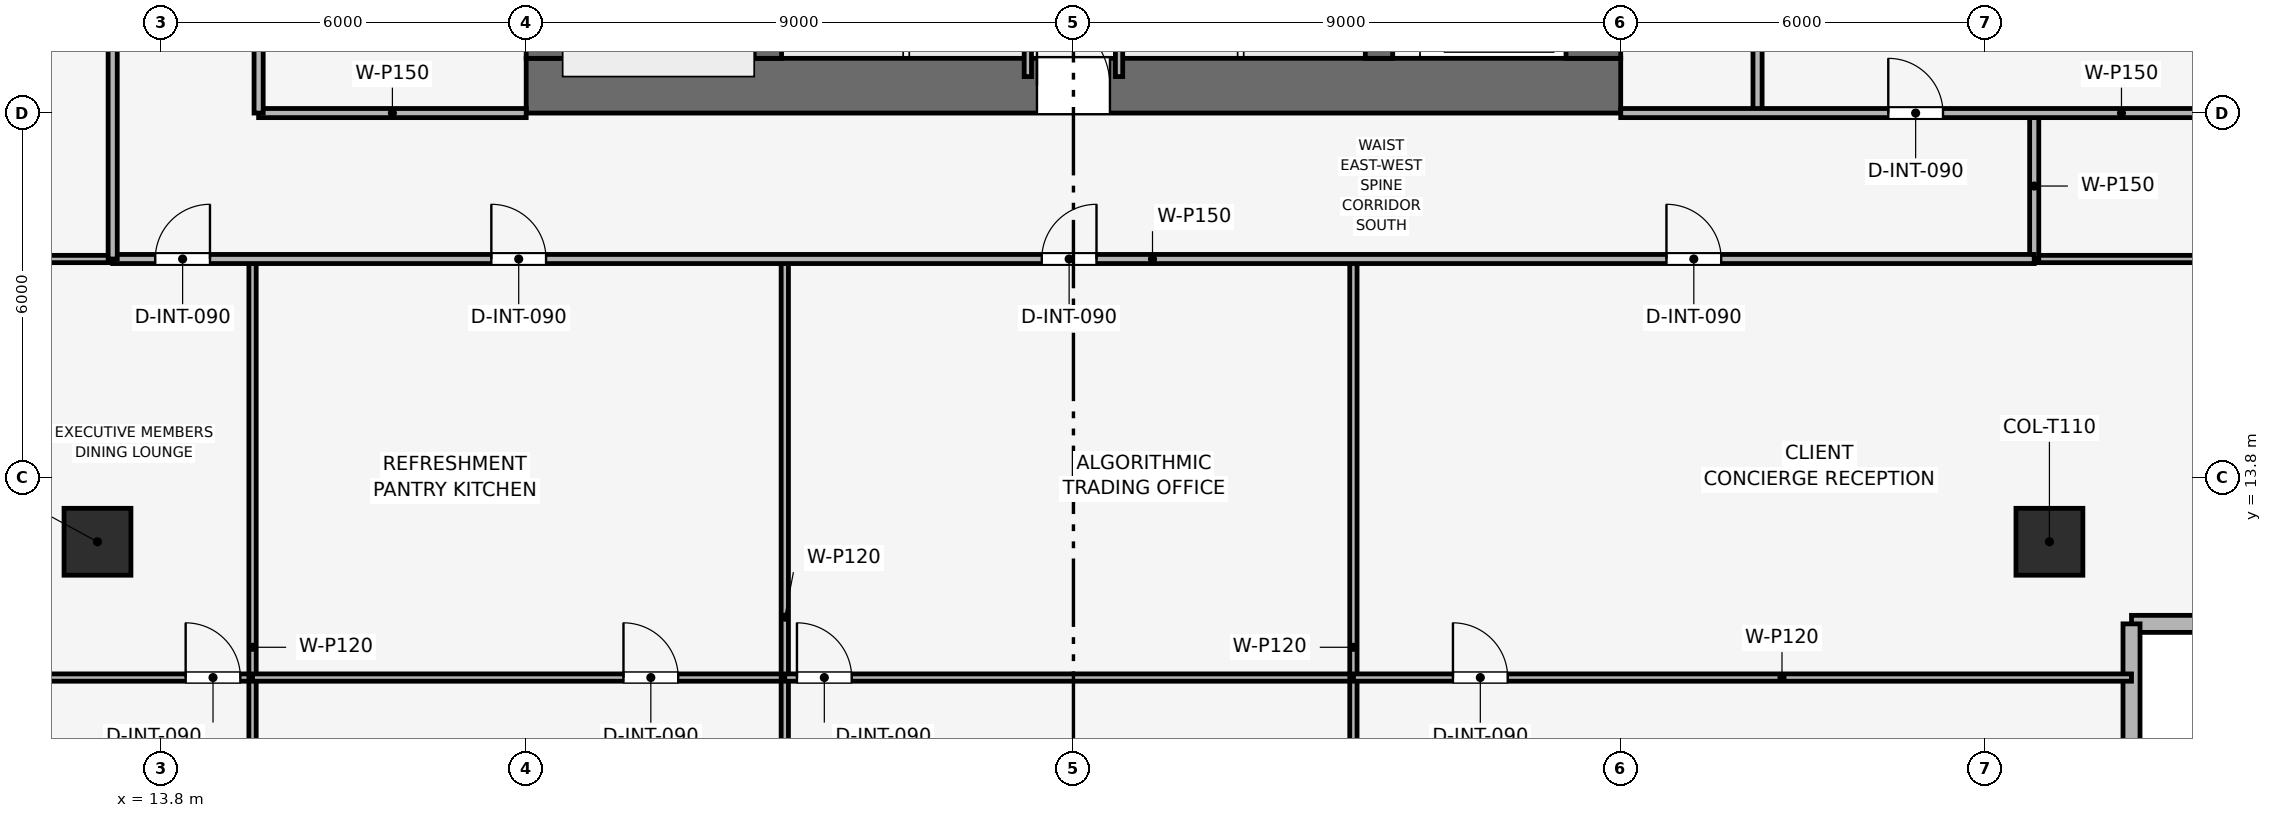
"""IFC4 building model, lengths in metres.
Left out: names, types, materials, properties, quantities, classifications, styles, units other than length and angle.
Written with IfcOpenShell. Run it as: python <this file> out.ifc"""

import sys

from ifc_helpers import new_model, si_unit, direction, frame, frame_2d, origin, origin_2d, place, context, subcontext, project, spatial, rectangle, extrude, element, fill, save


model = new_model("IFC4")
c1 = context("Model", 3, precision=1e-05, world=origin(), true_north=direction((0.0, 1.0)))
c2 = subcontext(c1, "Body", "Model", "MODEL_VIEW")
j1 = project(units=[si_unit("LENGTHUNIT", "METRE"), si_unit("PLANEANGLEUNIT", "RADIAN")], contexts=[c1])
p1 = place(None, origin())
s1 = spatial("IfcSite", under=j1, at=p1, CompositionType="ELEMENT")
p2 = place(p1, origin())
s2 = spatial("IfcBuilding", under=s1, at=p2, CompositionType="ELEMENT")
p3 = place(p2, frame((0.0, 0.0, 168.3)))
s3 = spatial("IfcBuildingStorey", under=s2, at=p3, CompositionType="ELEMENT", Elevation=168.3)
p4 = place(p3, frame((19.8, 20.25, 0.0), z_axis=(0.0, 0.0, 1.0), x_axis=(1.0, 0.0, 0.0)))
e1 = element("IfcWall", 1, at=p4, inside=s3, PredefinedType="SHEAR", context=c2, shape_type="SweptSolid", body=[
    extrude(rectangle(XDim=18.0, YDim=0.9, at=frame_2d((9.0, 0.0))), origin(), (0.0, 0.0, 1.0), 3.75),
])
p5 = place(p4, frame((8.4, 0.0, 0.0)))
e2 = element("IfcOpeningElement", 2, at=p5, cuts=e1, PredefinedType="OPENING", context=c2, shape_type="SweptSolid", body=[
    extrude(rectangle(XDim=1.2, YDim=2.2, at=frame_2d((0.6, 1.1))), frame((0.0, 0.46, 0.0), z_axis=(0.0, -1.0, 0.0), x_axis=(1.0, 0.0, 0.0)), (0.0, 0.0, 1.0), 0.92),
])
p6 = place(p3, frame((20.25, 20.7, 0.0), z_axis=(0.0, 0.0, 1.0), x_axis=(0.0, 1.0, 0.0)))
e3 = element("IfcWall", 3, at=p6, inside=s3, PredefinedType="SHEAR", context=c2, shape_type="SweptSolid", body=[
    extrude(rectangle(XDim=16.2, YDim=0.9, at=frame_2d((8.1, 0.0))), origin(), (0.0, 0.0, 1.0), 3.75),
])
p7 = place(p6, frame((10.1, 0.0, 0.0)))
e4 = element("IfcOpeningElement", 4, at=p7, cuts=e3, PredefinedType="OPENING", context=c2, shape_type="SweptSolid", body=[
    extrude(rectangle(XDim=1.1, YDim=2.15, at=frame_2d((0.55, 1.075))), frame((0.0, 0.46, 0.0), z_axis=(0.0, -1.0, 0.0), x_axis=(1.0, 0.0, 0.0)), (0.0, 0.0, 1.0), 0.92),
])
p8 = place(p3, frame((37.35, 20.7, 0.0), z_axis=(0.0, 0.0, 1.0), x_axis=(0.0, 1.0, 0.0)))
e5 = element("IfcWall", 5, at=p8, inside=s3, PredefinedType="SHEAR", context=c2, shape_type="SweptSolid", body=[
    extrude(rectangle(XDim=16.2, YDim=0.9, at=frame_2d((8.1, 0.0))), origin(), (0.0, 0.0, 1.0), 3.75),
])
p9 = place(p8, frame((4.6, 0.0, 0.0)))
e6 = element("IfcOpeningElement", 6, at=p9, cuts=e5, PredefinedType="OPENING", context=c2, shape_type="SweptSolid", body=[
    extrude(rectangle(XDim=1.1, YDim=2.15, at=frame_2d((0.55, 1.075))), frame((0.0, 0.46, 0.0), z_axis=(0.0, -1.0, 0.0), x_axis=(1.0, 0.0, 0.0)), (0.0, 0.0, 1.0), 0.92),
])
for number, where, z_axis, x_axis in (
    (7, (23.775, 20.7, 0.0), (0.0, 0.0, 1.0), (0.0, 1.0, 0.0)),
    (8, (33.825, 20.7, 0.0), (0.0, 0.0, 1.0), (0.0, 1.0, 0.0)),
):
    element("IfcWall", number, at=place(p3, frame(where, z_axis=z_axis, x_axis=x_axis)), inside=s3, PredefinedType="SHEAR", context=c2, shape_type="SweptSolid", body=[
        extrude(rectangle(XDim=16.2, YDim=0.45, at=frame_2d((8.1, 0.0))), origin(), (0.0, 0.0, 1.0), 3.75),
    ])
for number, where, z_axis, x_axis in (
    (9, (12.75, 12.75, 0.003), (0.0, 0.0, 1.0), (1.0, 0.0, 0.0)),
    (10, (44.85, 12.75, 0.003), (0.0, 0.0, 1.0), (1.0, 0.0, 0.0)),
):
    element("IfcColumn", number, at=place(p3, frame(where, z_axis=z_axis, x_axis=x_axis)), inside=s3, PredefinedType="COLUMN", context=c2, shape_type="SweptSolid", body=[
        extrude(rectangle(XDim=1.1, YDim=1.1, at=origin_2d()), origin(), (0.0, 0.0, 1.0), 3.489),
    ])
p10 = place(p3, frame((52.97, 11.4, 0.0), z_axis=(0.0, 0.0, 1.0), x_axis=(-1.0, 0.0, 0.0)))
e11 = element("IfcWall", 11, at=p10, inside=s3, PredefinedType="SOLIDWALL", context=c2, shape_type="SweptSolid", body=[
    extrude(rectangle(XDim=6.77, YDim=0.28, at=frame_2d((3.385, 0.0))), origin(), (0.0, 0.0, 1.0), 3.495),
])
p11 = place(p10, frame((2.135, 0.0, 0.9)))
e12 = element("IfcOpeningElement", 12, at=p11, cuts=e11, PredefinedType="OPENING", context=c2, shape_type="SweptSolid", body=[
    extrude(rectangle(XDim=2.5, YDim=1.9, at=frame_2d((1.25, 0.95))), frame((0.0, 0.15, 0.0), z_axis=(0.0, -1.0, 0.0), x_axis=(1.0, 0.0, 0.0)), (0.0, 0.0, 1.0), 0.3),
])
p12 = place(p3, frame((46.2, 11.4, 0.0), z_axis=(0.0, 0.0, 1.0), x_axis=(0.0, -1.0, 0.0)))
e13 = element("IfcWall", 13, at=p12, inside=s3, PredefinedType="SOLIDWALL", context=c2, shape_type="SweptSolid", body=[
    extrude(rectangle(XDim=6.77, YDim=0.28, at=frame_2d((3.385, 0.0))), origin(), (0.0, 0.0, 1.0), 3.495),
])
p13 = place(p12, frame((2.135, 0.0, 0.9)))
e14 = element("IfcOpeningElement", 14, at=p13, cuts=e13, PredefinedType="OPENING", context=c2, shape_type="SweptSolid", body=[
    extrude(rectangle(XDim=2.5, YDim=1.9, at=frame_2d((1.25, 0.95))), frame((0.0, 0.15, 0.0), z_axis=(0.0, -1.0, 0.0), x_axis=(1.0, 0.0, 0.0)), (0.0, 0.0, 1.0), 0.3),
])
for number, where, z_axis, x_axis in (
    (15, (28.05, 20.4, 0.0), (0.0, 0.0, 1.0), (0.0, 1.0, 0.0)),
    (16, (29.55, 20.4, 0.0), (0.0, 0.0, 1.0), (0.0, 1.0, 0.0)),
):
    element("IfcWall", number, at=place(p3, frame(where, z_axis=z_axis, x_axis=x_axis)), inside=s3, PredefinedType="PARTITIONING", context=c2, shape_type="SweptSolid", body=[
        extrude(rectangle(XDim=2.75, YDim=0.12, at=frame_2d((1.375, 0.0))), origin(), (0.0, 0.0, 1.0), 3.495),
    ])
p14 = place(p3, frame((15.4, 19.8, 0.0), z_axis=(0.0, 0.0, 1.0), x_axis=(1.0, 0.0, 0.0)))
e17 = element("IfcWall", 17, at=p14, inside=s3, PredefinedType="PARTITIONING", context=c2, shape_type="SweptSolid", body=[
    extrude(rectangle(XDim=4.4, YDim=0.15, at=frame_2d((2.2, 0.0))), origin(), (0.0, 0.0, 1.0), 3.03),
])
p15 = place(p3, frame((15.4, 19.8, 0.0), z_axis=(0.0, 0.0, 1.0), x_axis=(0.0, 1.0, 0.0)))
e18 = element("IfcWall", 18, at=p15, inside=s3, PredefinedType="PARTITIONING", context=c2, shape_type="SweptSolid", body=[
    extrude(rectangle(XDim=10.35, YDim=0.15, at=frame_2d((5.175, 0.0))), origin(), (0.0, 0.0, 1.0), 3.03),
])
p16 = place(p15, frame((1.2, 0.0, 0.0)))
e19 = element("IfcOpeningElement", 19, at=p16, cuts=e18, PredefinedType="OPENING", context=c2, shape_type="SweptSolid", body=[
    extrude(rectangle(XDim=0.9, YDim=2.1, at=frame_2d((0.45, 1.05))), frame((0.0, 0.085, 0.0), z_axis=(0.0, -1.0, 0.0), x_axis=(1.0, 0.0, 0.0)), (0.0, 0.0, 1.0), 0.17),
])
p17 = place(p15, frame((4.7, 0.0, 0.0)))
e20 = element("IfcOpeningElement", 20, at=p17, cuts=e18, PredefinedType="OPENING", context=c2, shape_type="SweptSolid", body=[
    extrude(rectangle(XDim=0.9, YDim=2.1, at=frame_2d((0.45, 1.05))), frame((0.0, 0.085, 0.0), z_axis=(0.0, -1.0, 0.0), x_axis=(1.0, 0.0, 0.0)), (0.0, 0.0, 1.0), 0.17),
])
p18 = place(p15, frame((8.1, 0.0, 0.0)))
e21 = element("IfcOpeningElement", 21, at=p18, cuts=e18, PredefinedType="OPENING", context=c2, shape_type="SweptSolid", body=[
    extrude(rectangle(XDim=0.95, YDim=2.1, at=frame_2d((0.475, 1.05))), frame((0.0, 0.085, 0.0), z_axis=(0.0, -1.0, 0.0), x_axis=(1.0, 0.0, 0.0)), (0.0, 0.0, 1.0), 0.17),
])
p19 = place(p3, frame((40.05, 19.8, 0.0), z_axis=(0.0, 0.0, 1.0), x_axis=(0.0, 1.0, 0.0)))
e22 = element("IfcWall", 22, at=p19, inside=s3, PredefinedType="PARTITIONING", context=c2, shape_type="SweptSolid", body=[
    extrude(rectangle(XDim=7.05, YDim=0.15, at=frame_2d((3.525, 0.0))), origin(), (0.0, 0.0, 1.0), 3.03),
])
p20 = place(p3, frame((11.4, 10.517, 0.0), z_axis=(0.0, 0.0, 1.0), x_axis=(1.0, 0.0, 0.0)))
e23 = element("IfcWall", 23, at=p20, inside=s3, PredefinedType="PARTITIONING", context=c2, shape_type="SweptSolid", body=[
    extrude(rectangle(XDim=3.9, YDim=0.12, at=frame_2d((1.95, 0.0))), origin(), (0.0, 0.0, 1.0), 2.98),
])
p21 = place(p20, frame((2.8, 0.0, 0.0)))
e24 = element("IfcOpeningElement", 24, at=p21, cuts=e23, PredefinedType="OPENING", context=c2, shape_type="SweptSolid", body=[
    extrude(rectangle(XDim=0.9, YDim=2.1, at=frame_2d((0.45, 1.05))), frame((0.0, 0.07, 0.0), z_axis=(0.0, -1.0, 0.0), x_axis=(1.0, 0.0, 0.0)), (0.0, 0.0, 1.0), 0.14),
])
p22 = place(p3, frame((15.3, 4.63, 0.0), z_axis=(0.0, 0.0, 1.0), x_axis=(0.0, 1.0, 0.0)))
e25 = element("IfcWall", 25, at=p22, inside=s3, PredefinedType="PARTITIONING", context=c2, shape_type="SweptSolid", body=[
    extrude(rectangle(XDim=12.77, YDim=0.12, at=frame_2d((6.385, 0.0))), origin(), (0.0, 0.0, 1.0), 2.98),
])
p23 = place(p3, frame((15.3, 10.517, 0.0), z_axis=(0.0, 0.0, 1.0), x_axis=(1.0, 0.0, 0.0)))
e26 = element("IfcWall", 26, at=p23, inside=s3, PredefinedType="PARTITIONING", context=c2, shape_type="SweptSolid", body=[
    extrude(rectangle(XDim=8.753, YDim=0.12, at=frame_2d((4.376, 0.0))), origin(), (0.0, 0.0, 1.0), 3.03),
])
p24 = place(p23, frame((6.1, 0.0, 0.0)))
e27 = element("IfcOpeningElement", 27, at=p24, cuts=e26, PredefinedType="OPENING", context=c2, shape_type="SweptSolid", body=[
    extrude(rectangle(XDim=0.9, YDim=2.1, at=frame_2d((0.45, 1.05))), frame((0.0, 0.07, 0.0), z_axis=(0.0, -1.0, 0.0), x_axis=(1.0, 0.0, 0.0)), (0.0, 0.0, 1.0), 0.14),
])
p25 = place(p3, frame((24.053, 4.63, 0.0), z_axis=(0.0, 0.0, 1.0), x_axis=(0.0, 1.0, 0.0)))
e28 = element("IfcWall", 28, at=p25, inside=s3, PredefinedType="PARTITIONING", context=c2, shape_type="SweptSolid", body=[
    extrude(rectangle(XDim=12.77, YDim=0.12, at=frame_2d((6.385, 0.0))), origin(), (0.0, 0.0, 1.0), 2.98),
])
p26 = place(p3, frame((24.053, 10.517, 0.0), z_axis=(0.0, 0.0, 1.0), x_axis=(1.0, 0.0, 0.0)))
e29 = element("IfcWall", 29, at=p26, inside=s3, PredefinedType="PARTITIONING", context=c2, shape_type="SweptSolid", body=[
    extrude(rectangle(XDim=9.351, YDim=0.12, at=frame_2d((4.676, 0.0))), origin(), (0.0, 0.0, 1.0), 3.03),
])
p27 = place(p26, frame((0.2, 0.0, 0.0)))
e30 = element("IfcOpeningElement", 30, at=p27, cuts=e29, PredefinedType="OPENING", context=c2, shape_type="SweptSolid", body=[
    extrude(rectangle(XDim=0.9, YDim=2.1, at=frame_2d((0.45, 1.05))), frame((0.0, 0.07, 0.0), z_axis=(0.0, -1.0, 0.0), x_axis=(1.0, 0.0, 0.0)), (0.0, 0.0, 1.0), 0.14),
])
p28 = place(p3, frame((33.404, 4.63, 0.0), z_axis=(0.0, 0.0, 1.0), x_axis=(0.0, 1.0, 0.0)))
e31 = element("IfcWall", 31, at=p28, inside=s3, PredefinedType="PARTITIONING", context=c2, shape_type="SweptSolid", body=[
    extrude(rectangle(XDim=12.77, YDim=0.12, at=frame_2d((6.385, 0.0))), origin(), (0.0, 0.0, 1.0), 2.98),
])
p29 = place(p3, frame((33.404, 10.517, 0.0), z_axis=(0.0, 0.0, 1.0), x_axis=(1.0, 0.0, 0.0)))
e32 = element("IfcWall", 32, at=p29, inside=s3, PredefinedType="PARTITIONING", context=c2, shape_type="SweptSolid", body=[
    extrude(rectangle(XDim=12.796, YDim=0.12, at=frame_2d((6.398, 0.0))), origin(), (0.0, 0.0, 1.0), 2.98),
])
p30 = place(p29, frame((1.637, 0.0, 0.0)))
e33 = element("IfcOpeningElement", 33, at=p30, cuts=e32, PredefinedType="OPENING", context=c2, shape_type="SweptSolid", body=[
    extrude(rectangle(XDim=0.9, YDim=2.1, at=frame_2d((0.45, 1.05))), frame((0.0, 0.07, 0.0), z_axis=(0.0, -1.0, 0.0), x_axis=(1.0, 0.0, 0.0)), (0.0, 0.0, 1.0), 0.14),
])
p31 = place(p3, frame((4.63, 17.4, 0.0), z_axis=(0.0, 0.0, 1.0), x_axis=(1.0, 0.0, 0.0)))
e34 = element("IfcWall", 34, at=p31, inside=s3, PredefinedType="PARTITIONING", context=c2, shape_type="SweptSolid", body=[
    extrude(rectangle(XDim=8.37, YDim=0.12, at=frame_2d((4.185, 0.0))), origin(), (0.0, 0.0, 1.0), 2.98),
])
p32 = place(p3, frame((44.6, 17.4, 0.0), z_axis=(0.0, 0.0, 1.0), x_axis=(1.0, 0.0, 0.0)))
e35 = element("IfcWall", 35, at=p32, inside=s3, PredefinedType="PARTITIONING", context=c2, shape_type="SweptSolid", body=[
    extrude(rectangle(XDim=8.37, YDim=0.12, at=frame_2d((4.185, 0.0))), origin(), (0.0, 0.0, 1.0), 2.98),
])
p33 = place(p3, frame((44.6, 17.4, 0.0), z_axis=(0.0, 0.0, 1.0), x_axis=(0.0, 1.0, 0.0)))
e36 = element("IfcWall", 36, at=p33, inside=s3, PredefinedType="PARTITIONING", context=c2, shape_type="SweptSolid", body=[
    extrude(rectangle(XDim=2.4, YDim=0.15, at=frame_2d((1.2, 0.0))), origin(), (0.0, 0.0, 1.0), 3.495),
])
p34 = place(p3, frame((37.8, 19.8, 0.0), z_axis=(0.0, 0.0, 1.0), x_axis=(1.0, 0.0, 0.0)))
e37 = element("IfcWall", 37, at=p34, inside=s3, PredefinedType="PARTITIONING", context=c2, shape_type="SweptSolid", body=[
    extrude(rectangle(XDim=15.17, YDim=0.15, at=frame_2d((7.585, 0.0))), origin(), (0.0, 0.0, 1.0), 2.98),
])
p35 = place(p34, frame((4.4, 0.0, 0.0)))
e38 = element("IfcOpeningElement", 38, at=p35, cuts=e37, PredefinedType="OPENING", context=c2, shape_type="SweptSolid", body=[
    extrude(rectangle(XDim=0.9, YDim=2.1, at=frame_2d((0.45, 1.05))), frame((0.0, 0.085, 0.0), z_axis=(0.0, -1.0, 0.0), x_axis=(1.0, 0.0, 0.0)), (0.0, 0.0, 1.0), 0.17),
])
p36 = place(p3, frame((13.0, 17.4, 0.0), z_axis=(0.0, 0.0, 1.0), x_axis=(1.0, 0.0, 0.0)))
e39 = element("IfcWall", 39, at=p36, inside=s3, PredefinedType="PARTITIONING", context=c2, shape_type="SweptSolid", body=[
    extrude(rectangle(XDim=31.6, YDim=0.15, at=frame_2d((15.8, 0.0))), origin(), (0.0, 0.0, 1.0), 3.03),
])
p37 = place(p36, frame((0.7, 0.0, 0.0)))
e40 = element("IfcOpeningElement", 40, at=p37, cuts=e39, PredefinedType="OPENING", context=c2, shape_type="SweptSolid", body=[
    extrude(rectangle(XDim=0.9, YDim=2.1, at=frame_2d((0.45, 1.05))), frame((0.0, 0.085, 0.0), z_axis=(0.0, -1.0, 0.0), x_axis=(1.0, 0.0, 0.0)), (0.0, 0.0, 1.0), 0.17),
])
p38 = place(p36, frame((6.227, 0.0, 0.0)))
e41 = element("IfcOpeningElement", 41, at=p38, cuts=e39, PredefinedType="OPENING", context=c2, shape_type="SweptSolid", body=[
    extrude(rectangle(XDim=0.9, YDim=2.1, at=frame_2d((0.45, 1.05))), frame((0.0, 0.085, 0.0), z_axis=(0.0, -1.0, 0.0), x_axis=(1.0, 0.0, 0.0)), (0.0, 0.0, 1.0), 0.17),
])
p39 = place(p36, frame((15.279, 0.0, 0.0)))
e42 = element("IfcOpeningElement", 42, at=p39, cuts=e39, PredefinedType="OPENING", context=c2, shape_type="SweptSolid", body=[
    extrude(rectangle(XDim=0.9, YDim=2.1, at=frame_2d((0.45, 1.05))), frame((0.0, 0.085, 0.0), z_axis=(0.0, -1.0, 0.0), x_axis=(1.0, 0.0, 0.0)), (0.0, 0.0, 1.0), 0.17),
])
p40 = place(p36, frame((25.552, 0.0, 0.0)))
e43 = element("IfcOpeningElement", 43, at=p40, cuts=e39, PredefinedType="OPENING", context=c2, shape_type="SweptSolid", body=[
    extrude(rectangle(XDim=0.9, YDim=2.1, at=frame_2d((0.45, 1.05))), frame((0.0, 0.085, 0.0), z_axis=(0.0, -1.0, 0.0), x_axis=(1.0, 0.0, 0.0)), (0.0, 0.0, 1.0), 0.17),
])
p41 = place(p3, frame((13.0, 17.4, 0.0), z_axis=(0.0, 0.0, 1.0), x_axis=(0.0, 1.0, 0.0)))
e44 = element("IfcWall", 44, at=p41, inside=s3, PredefinedType="PARTITIONING", context=c2, shape_type="SweptSolid", body=[
    extrude(rectangle(XDim=22.8, YDim=0.15, at=frame_2d((11.4, 0.0))), origin(), (0.0, 0.0, 1.0), 3.03),
])
p42 = place(p41, frame((10.95, 0.0, 0.0)))
e45 = element("IfcOpeningElement", 45, at=p42, cuts=e44, PredefinedType="OPENING", context=c2, shape_type="SweptSolid", body=[
    extrude(rectangle(XDim=0.9, YDim=2.1, at=frame_2d((0.45, 1.05))), frame((0.0, 0.085, 0.0), z_axis=(0.0, -1.0, 0.0), x_axis=(1.0, 0.0, 0.0)), (0.0, 0.0, 1.0), 0.17),
])
p43 = place(p21, origin())
e46 = element("IfcDoor", 46, at=p43, inside=s3, OperationType="SINGLE_SWING_LEFT", PredefinedType="DOOR", context=c2, shape_type="SweptSolid", body=[
    extrude(rectangle(XDim=0.9, YDim=2.1, at=frame_2d((0.45, 1.05))), frame((0.0, 0.025, 0.0), z_axis=(0.0, -1.0, 0.0), x_axis=(1.0, 0.0, 0.0)), (0.0, 0.0, 1.0), 0.05),
])
fill(e24, e46)
p44 = place(p24, origin())
e47 = element("IfcDoor", 47, at=p44, inside=s3, OperationType="SINGLE_SWING_LEFT", PredefinedType="DOOR", context=c2, shape_type="SweptSolid", body=[
    extrude(rectangle(XDim=0.9, YDim=2.1, at=frame_2d((0.45, 1.05))), frame((0.0, 0.025, 0.0), z_axis=(0.0, -1.0, 0.0), x_axis=(1.0, 0.0, 0.0)), (0.0, 0.0, 1.0), 0.05),
])
fill(e27, e47)
p45 = place(p27, origin())
e48 = element("IfcDoor", 48, at=p45, inside=s3, OperationType="SINGLE_SWING_LEFT", PredefinedType="DOOR", context=c2, shape_type="SweptSolid", body=[
    extrude(rectangle(XDim=0.9, YDim=2.1, at=frame_2d((0.45, 1.05))), frame((0.0, 0.025, 0.0), z_axis=(0.0, -1.0, 0.0), x_axis=(1.0, 0.0, 0.0)), (0.0, 0.0, 1.0), 0.05),
])
fill(e30, e48)
p46 = place(p30, origin())
e49 = element("IfcDoor", 49, at=p46, inside=s3, OperationType="SINGLE_SWING_LEFT", PredefinedType="DOOR", context=c2, shape_type="SweptSolid", body=[
    extrude(rectangle(XDim=0.9, YDim=2.1, at=frame_2d((0.45, 1.05))), frame((0.0, 0.025, 0.0), z_axis=(0.0, -1.0, 0.0), x_axis=(1.0, 0.0, 0.0)), (0.0, 0.0, 1.0), 0.05),
])
fill(e33, e49)
p47 = place(p35, origin())
e50 = element("IfcDoor", 50, at=p47, inside=s3, OperationType="SINGLE_SWING_LEFT", PredefinedType="DOOR", context=c2, shape_type="SweptSolid", body=[
    extrude(rectangle(XDim=0.9, YDim=2.1, at=frame_2d((0.45, 1.05))), frame((0.0, 0.025, 0.0), z_axis=(0.0, -1.0, 0.0), x_axis=(1.0, 0.0, 0.0)), (0.0, 0.0, 1.0), 0.05),
])
fill(e38, e50)
p48 = place(p37, origin())
e51 = element("IfcDoor", 51, at=p48, inside=s3, OperationType="SINGLE_SWING_RIGHT", PredefinedType="DOOR", context=c2, shape_type="SweptSolid", body=[
    extrude(rectangle(XDim=0.9, YDim=2.1, at=frame_2d((0.45, 1.05))), frame((0.0, 0.025, 0.0), z_axis=(0.0, -1.0, 0.0), x_axis=(1.0, 0.0, 0.0)), (0.0, 0.0, 1.0), 0.05),
])
fill(e40, e51)
p49 = place(p38, origin())
e52 = element("IfcDoor", 52, at=p49, inside=s3, OperationType="SINGLE_SWING_LEFT", PredefinedType="DOOR", context=c2, shape_type="SweptSolid", body=[
    extrude(rectangle(XDim=0.9, YDim=2.1, at=frame_2d((0.45, 1.05))), frame((0.0, 0.025, 0.0), z_axis=(0.0, -1.0, 0.0), x_axis=(1.0, 0.0, 0.0)), (0.0, 0.0, 1.0), 0.05),
])
fill(e41, e52)
p50 = place(p39, origin())
e53 = element("IfcDoor", 53, at=p50, inside=s3, OperationType="SINGLE_SWING_RIGHT", PredefinedType="DOOR", context=c2, shape_type="SweptSolid", body=[
    extrude(rectangle(XDim=0.9, YDim=2.1, at=frame_2d((0.45, 1.05))), frame((0.0, 0.025, 0.0), z_axis=(0.0, -1.0, 0.0), x_axis=(1.0, 0.0, 0.0)), (0.0, 0.0, 1.0), 0.05),
])
fill(e42, e53)
p51 = place(p40, origin())
e54 = element("IfcDoor", 54, at=p51, inside=s3, OperationType="SINGLE_SWING_LEFT", PredefinedType="DOOR", context=c2, shape_type="SweptSolid", body=[
    extrude(rectangle(XDim=0.9, YDim=2.1, at=frame_2d((0.45, 1.05))), frame((0.0, 0.025, 0.0), z_axis=(0.0, -1.0, 0.0), x_axis=(1.0, 0.0, 0.0)), (0.0, 0.0, 1.0), 0.05),
])
fill(e43, e54)
p52 = place(p5, origin())
e55 = element("IfcDoor", 55, at=p52, inside=s3, OperationType="SINGLE_SWING_LEFT", PredefinedType="DOOR", context=c2, shape_type="SweptSolid", body=[
    extrude(rectangle(XDim=1.2, YDim=2.2, at=frame_2d((0.6, 1.1))), frame((0.0, 0.025, 0.0), z_axis=(0.0, -1.0, 0.0), x_axis=(1.0, 0.0, 0.0)), (0.0, 0.0, 1.0), 0.05),
])
fill(e2, e55)
save(model, sys.argv[1])
